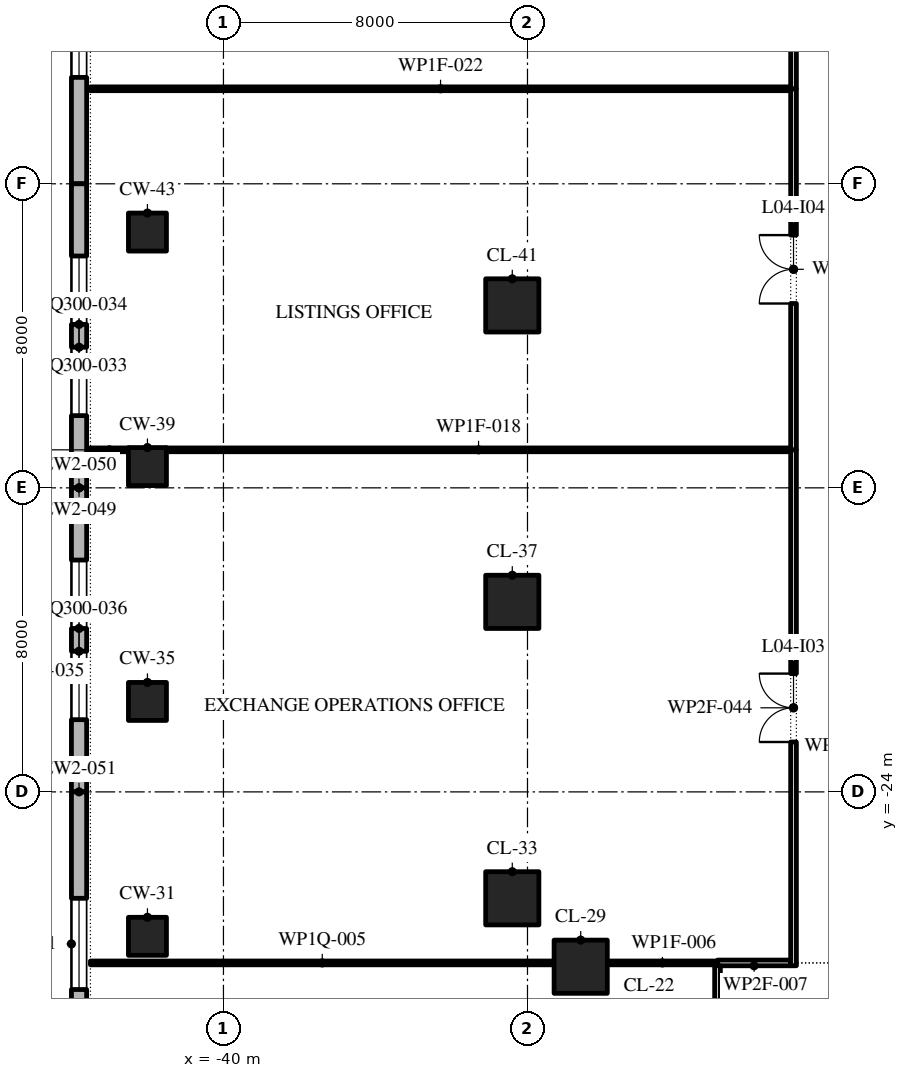
"""IFC4 building model, lengths in metres.
Left out: names, types, materials, properties, quantities, classifications, styles, units other than length and angle.
Written with IfcOpenShell. Run it as: python <this file> out.ifc"""

import sys

from ifc_helpers import new_model, si_unit, direction, frame, frame_2d, origin, origin_2d, place, context, subcontext, project, spatial, polyline, rectangle, outline, extrude, element, fill, save


model = new_model("IFC4")
c1 = context("Model", 3, precision=1e-05, world=origin(), true_north=direction((0.0, 1.0)))
c2 = subcontext(c1, "Body", "Model", "MODEL_VIEW")
j1 = project(units=[si_unit("LENGTHUNIT", "METRE"), si_unit("PLANEANGLEUNIT", "RADIAN")], contexts=[c1])
p1 = place(None, origin())
s1 = spatial("IfcSite", under=j1, at=p1, CompositionType="ELEMENT")
p2 = place(p1, origin())
s2 = spatial("IfcBuilding", under=s1, at=p2, CompositionType="ELEMENT")
p3 = place(p2, frame((0.0, 0.0, 24.0)))
s3 = spatial("IfcBuildingStorey", under=s2, at=p3, CompositionType="ELEMENT", Elevation=24.0)
p4 = place(p3, frame((-30.6, -28.6, 0.0), z_axis=(0.0, 0.0, 1.0), x_axis=(1.0, 0.0, 0.0)))
e1 = element("IfcColumn", 1, at=p4, inside=s3, PredefinedType="COLUMN", context=c2, shape_type="SweptSolid", body=[
    extrude(rectangle(XDim=1.4, YDim=1.4, at=origin_2d()), origin(), (0.0, 0.0, 1.0), 4.8),
])
p5 = place(p3, frame((-42.0, -27.8, 0.0), z_axis=(0.0, 0.0, 1.0), x_axis=(1.0, 0.0, 0.0)))
e2 = element("IfcColumn", 2, at=p5, inside=s3, PredefinedType="COLUMN", context=c2, shape_type="SweptSolid", body=[
    extrude(rectangle(XDim=1.0, YDim=1.0, at=origin_2d()), origin(), (0.0, 0.0, 1.0), 4.8),
])
p6 = place(p3, frame((-32.4, -26.8, 0.0), z_axis=(0.0, 0.0, 1.0), x_axis=(1.0, 0.0, 0.0)))
e3 = element("IfcColumn", 3, at=p6, inside=s3, PredefinedType="COLUMN", context=c2, shape_type="SweptSolid", body=[
    extrude(rectangle(XDim=1.4, YDim=1.4, at=origin_2d()), origin(), (0.0, 0.0, 1.0), 4.8),
])
p7 = place(p3, frame((-42.0, -21.62, 0.0), z_axis=(0.0, 0.0, 1.0), x_axis=(1.0, 0.0, 0.0)))
e4 = element("IfcColumn", 4, at=p7, inside=s3, PredefinedType="COLUMN", context=c2, shape_type="SweptSolid", body=[
    extrude(rectangle(XDim=1.0, YDim=1.0, at=origin_2d()), origin(), (0.0, 0.0, 1.0), 4.8),
])
p8 = place(p3, frame((-32.4, -19.0, 0.0), z_axis=(0.0, 0.0, 1.0), x_axis=(1.0, 0.0, 0.0)))
e5 = element("IfcColumn", 5, at=p8, inside=s3, PredefinedType="COLUMN", context=c2, shape_type="SweptSolid", body=[
    extrude(rectangle(XDim=1.4, YDim=1.4, at=origin_2d()), origin(), (0.0, 0.0, 1.0), 4.8),
])
p9 = place(p3, frame((-42.0, -15.44, 0.0), z_axis=(0.0, 0.0, 1.0), x_axis=(1.0, 0.0, 0.0)))
e6 = element("IfcColumn", 6, at=p9, inside=s3, PredefinedType="COLUMN", context=c2, shape_type="SweptSolid", body=[
    extrude(rectangle(XDim=1.0, YDim=1.0, at=origin_2d()), origin(), (0.0, 0.0, 1.0), 4.8),
])
p10 = place(p3, frame((-32.4, -11.2, 0.0), z_axis=(0.0, 0.0, 1.0), x_axis=(1.0, 0.0, 0.0)))
e7 = element("IfcColumn", 7, at=p10, inside=s3, PredefinedType="COLUMN", context=c2, shape_type="SweptSolid", body=[
    extrude(rectangle(XDim=1.4, YDim=1.4, at=origin_2d()), origin(), (0.0, 0.0, 1.0), 4.8),
])
p11 = place(p3, frame((-42.0, -9.27, 0.0), z_axis=(0.0, 0.0, 1.0), x_axis=(1.0, 0.0, 0.0)))
e8 = element("IfcColumn", 8, at=p11, inside=s3, PredefinedType="COLUMN", context=c2, shape_type="SweptSolid", body=[
    extrude(rectangle(XDim=1.0, YDim=1.0, at=origin_2d()), origin(), (0.0, 0.0, 1.0), 4.8),
])
p12 = place(p3, frame((-43.8, 0.0, 0.0), z_axis=(0.0, 0.0, 1.0), x_axis=(0.0, -1.0, 0.0)))
e9 = element("IfcWall", 9, at=p12, inside=s3, PredefinedType="STANDARD", context=c2, shape_type="SweptSolid", body=[
    extrude(rectangle(XDim=8.0, YDim=0.4, at=frame_2d((4.0, 0.0))), origin(), (0.0, 0.0, 1.0), 4.5),
])
p13 = place(p12, frame((2.8, 0.0, 0.9)))
e10 = element("IfcOpeningElement", 10, at=p13, cuts=e9, PredefinedType="OPENING", context=c2, shape_type="SweptSolid", body=[
    extrude(outline(polyline([(0.0, 0.0), (2.4, 0.0), (2.4, 1.5), (2.378, 1.758), (2.313, 2.009), (2.207, 2.245), (2.063, 2.46), (1.885, 2.648), (1.677, 2.804), (1.447, 2.922), (1.2, 3.0), (0.953, 2.922), (0.722, 2.804), (0.515, 2.648), (0.337, 2.46), (0.193, 2.245), (0.087, 2.009), (0.022, 1.758), (0.0, 1.5), (0.0, 0.0)])), frame((0.0, 0.21, 0.0), z_axis=(0.0, -1.0, 0.0), x_axis=(1.0, 0.0, 0.0)), (0.0, 0.0, 1.0), 0.42),
])
p14 = place(p3, frame((-43.8, -8.0, 0.0), z_axis=(0.0, 0.0, 1.0), x_axis=(0.0, -1.0, 0.0)))
e11 = element("IfcWall", 11, at=p14, inside=s3, PredefinedType="STANDARD", context=c2, shape_type="SweptSolid", body=[
    extrude(rectangle(XDim=8.0, YDim=0.4, at=frame_2d((4.0, 0.0))), origin(), (0.0, 0.0, 1.0), 4.5),
])
p15 = place(p14, frame((1.9, 0.0, 0.9)))
e12 = element("IfcOpeningElement", 12, at=p15, cuts=e11, PredefinedType="OPENING", context=c2, shape_type="SweptSolid", body=[
    extrude(outline(polyline([(0.0, 0.0), (1.8, 0.0), (1.8, 1.5), (1.785, 1.729), (1.738, 1.954), (1.662, 2.17), (1.558, 2.375), (1.427, 2.563), (1.271, 2.732), (1.095, 2.879), (0.9, 3.0), (0.705, 2.879), (0.529, 2.732), (0.373, 2.563), (0.242, 2.375), (0.138, 2.17), (0.062, 1.954), (0.015, 1.729), (0.0, 1.5), (0.0, 0.0)])), frame((0.0, 0.21, 0.0), z_axis=(0.0, -1.0, 0.0), x_axis=(1.0, 0.0, 0.0)), (0.0, 0.0, 1.0), 0.42),
])
p16 = place(p14, frame((4.3, 0.0, 0.9)))
e13 = element("IfcOpeningElement", 13, at=p16, cuts=e11, PredefinedType="OPENING", context=c2, shape_type="SweptSolid", body=[
    extrude(outline(polyline([(0.0, 0.0), (1.8, 0.0), (1.8, 1.5), (1.785, 1.729), (1.738, 1.954), (1.662, 2.17), (1.558, 2.375), (1.427, 2.563), (1.271, 2.732), (1.095, 2.879), (0.9, 3.0), (0.705, 2.879), (0.529, 2.732), (0.373, 2.563), (0.242, 2.375), (0.138, 2.17), (0.062, 1.954), (0.015, 1.729), (0.0, 1.5), (0.0, 0.0)])), frame((0.0, 0.21, 0.0), z_axis=(0.0, -1.0, 0.0), x_axis=(1.0, 0.0, 0.0)), (0.0, 0.0, 1.0), 0.42),
])
p17 = place(p3, frame((-43.8, -16.0, 0.0), z_axis=(0.0, 0.0, 1.0), x_axis=(0.0, -1.0, 0.0)))
e14 = element("IfcWall", 14, at=p17, inside=s3, PredefinedType="STANDARD", context=c2, shape_type="SweptSolid", body=[
    extrude(rectangle(XDim=8.0, YDim=0.4, at=frame_2d((4.0, 0.0))), origin(), (0.0, 0.0, 1.0), 4.5),
])
p18 = place(p17, frame((1.9, 0.0, 0.9)))
e15 = element("IfcOpeningElement", 15, at=p18, cuts=e14, PredefinedType="OPENING", context=c2, shape_type="SweptSolid", body=[
    extrude(outline(polyline([(0.0, 0.0), (1.8, 0.0), (1.8, 1.5), (1.785, 1.729), (1.738, 1.954), (1.662, 2.17), (1.558, 2.375), (1.427, 2.563), (1.271, 2.732), (1.095, 2.879), (0.9, 3.0), (0.705, 2.879), (0.529, 2.732), (0.373, 2.563), (0.242, 2.375), (0.138, 2.17), (0.062, 1.954), (0.015, 1.729), (0.0, 1.5), (0.0, 0.0)])), frame((0.0, 0.21, 0.0), z_axis=(0.0, -1.0, 0.0), x_axis=(1.0, 0.0, 0.0)), (0.0, 0.0, 1.0), 0.42),
])
p19 = place(p17, frame((4.3, 0.0, 0.9)))
e16 = element("IfcOpeningElement", 16, at=p19, cuts=e14, PredefinedType="OPENING", context=c2, shape_type="SweptSolid", body=[
    extrude(outline(polyline([(0.0, 0.0), (1.8, 0.0), (1.8, 1.5), (1.785, 1.729), (1.738, 1.954), (1.662, 2.17), (1.558, 2.375), (1.427, 2.563), (1.271, 2.732), (1.095, 2.879), (0.9, 3.0), (0.705, 2.879), (0.529, 2.732), (0.373, 2.563), (0.242, 2.375), (0.138, 2.17), (0.062, 1.954), (0.015, 1.729), (0.0, 1.5), (0.0, 0.0)])), frame((0.0, 0.21, 0.0), z_axis=(0.0, -1.0, 0.0), x_axis=(1.0, 0.0, 0.0)), (0.0, 0.0, 1.0), 0.42),
])
p20 = place(p3, frame((-43.8, -24.0, 0.0), z_axis=(0.0, 0.0, 1.0), x_axis=(0.0, -1.0, 0.0)))
e17 = element("IfcWall", 17, at=p20, inside=s3, PredefinedType="STANDARD", context=c2, shape_type="SweptSolid", body=[
    extrude(rectangle(XDim=8.0, YDim=0.4, at=frame_2d((4.0, 0.0))), origin(), (0.0, 0.0, 1.0), 4.5),
])
p21 = place(p20, frame((2.8, 0.0, 0.9)))
e18 = element("IfcOpeningElement", 18, at=p21, cuts=e17, PredefinedType="OPENING", context=c2, shape_type="SweptSolid", body=[
    extrude(outline(polyline([(0.0, 0.0), (2.4, 0.0), (2.4, 1.5), (2.378, 1.758), (2.313, 2.009), (2.207, 2.245), (2.063, 2.46), (1.885, 2.648), (1.677, 2.804), (1.447, 2.922), (1.2, 3.0), (0.953, 2.922), (0.722, 2.804), (0.515, 2.648), (0.337, 2.46), (0.193, 2.245), (0.087, 2.009), (0.022, 1.758), (0.0, 1.5), (0.0, 0.0)])), frame((0.0, 0.21, 0.0), z_axis=(0.0, -1.0, 0.0), x_axis=(1.0, 0.0, 0.0)), (0.0, 0.0, 1.0), 0.42),
])
p22 = place(p3, frame((-43.5, -28.5, 0.0), z_axis=(0.0, 0.0, 1.0), x_axis=(1.0, 0.0, 0.0)))
e19 = element("IfcWall", 19, at=p22, inside=s3, PredefinedType="PARTITIONING", context=c2, shape_type="SweptSolid", body=[
    extrude(rectangle(XDim=12.2, YDim=0.1, at=frame_2d((6.1, 0.0))), origin(), (0.0, 0.0, 1.0), 3.964),
])
p23 = place(p3, frame((-29.9, -28.5, 0.0), z_axis=(0.0, 0.0, 1.0), x_axis=(1.0, 0.0, 0.0)))
e20 = element("IfcWall", 20, at=p23, inside=s3, PredefinedType="PARTITIONING", context=c2, shape_type="SweptSolid", body=[
    extrude(rectangle(XDim=2.9, YDim=0.1, at=frame_2d((1.45, 0.0))), origin(), (0.0, 0.0, 1.0), 4.5),
])
p24 = place(p3, frame((-27.0, -28.5, 0.0), z_axis=(0.0, 0.0, 1.0), x_axis=(1.0, 0.0, 0.0)))
e21 = element("IfcWall", 21, at=p24, inside=s3, PredefinedType="PARTITIONING", context=c2, shape_type="SweptSolid", body=[
    extrude(rectangle(XDim=1.925, YDim=0.15, at=frame_2d((0.962, 0.0))), origin(), (0.0, 0.0, 1.0), 4.5),
])
p25 = place(p3, frame((-43.5, -15.0, 0.0), z_axis=(0.0, 0.0, 1.0), x_axis=(1.0, 0.0, 0.0)))
e22 = element("IfcWall", 22, at=p25, inside=s3, PredefinedType="PARTITIONING", context=c2, shape_type="SweptSolid", body=[
    extrude(rectangle(XDim=1.0, YDim=0.1, at=frame_2d((0.5, 0.0))), origin(), (0.0, 0.0, 1.0), 4.5),
])
p26 = place(p3, frame((-41.5, -15.0, 0.0), z_axis=(0.0, 0.0, 1.0), x_axis=(1.0, 0.0, 0.0)))
e23 = element("IfcWall", 23, at=p26, inside=s3, PredefinedType="PARTITIONING", context=c2, shape_type="SweptSolid", body=[
    extrude(rectangle(XDim=16.425, YDim=0.1, at=frame_2d((8.212, 0.0))), origin(), (0.0, 0.0, 1.0), 4.5),
])
p27 = place(p3, frame((-43.5, -5.5, 0.0), z_axis=(0.0, 0.0, 1.0), x_axis=(1.0, 0.0, 0.0)))
e24 = element("IfcWall", 24, at=p27, inside=s3, PredefinedType="PARTITIONING", context=c2, shape_type="SweptSolid", body=[
    extrude(rectangle(XDim=18.425, YDim=0.1, at=frame_2d((9.212, 0.0))), origin(), (0.0, 0.0, 1.0), 4.5),
])
p28 = place(p3, frame((-27.0, -32.0, 0.0), z_axis=(0.0, 0.0, 1.0), x_axis=(0.0, 1.0, 0.0)))
e25 = element("IfcWall", 25, at=p28, inside=s3, PredefinedType="PARTITIONING", context=c2, shape_type="SweptSolid", body=[
    extrude(rectangle(XDim=3.425, YDim=0.15, at=frame_2d((1.712, 0.0))), origin(), (0.0, 0.0, 1.0), 4.5),
])
p29 = place(p3, frame((-25.0, -28.575, 0.0), z_axis=(0.0, 0.0, 1.0), x_axis=(0.0, 1.0, 0.0)))
e26 = element("IfcWall", 26, at=p29, inside=s3, PredefinedType="PARTITIONING", context=c2, shape_type="SweptSolid", body=[
    extrude(rectangle(XDim=13.575, YDim=0.15, at=frame_2d((6.788, 0.0))), origin(), (0.0, 0.0, 1.0), 4.5),
])
p30 = place(p29, frame((5.887, 0.0, 0.0)))
e27 = element("IfcOpeningElement", 27, at=p30, cuts=e26, PredefinedType="OPENING", context=c2, shape_type="SweptSolid", body=[
    extrude(rectangle(XDim=1.8, YDim=2.1, at=frame_2d((0.9, 1.05))), frame((0.0, 0.085, 0.0), z_axis=(0.0, -1.0, 0.0), x_axis=(1.0, 0.0, 0.0)), (0.0, 0.0, 1.0), 0.17),
])
p31 = place(p3, frame((-25.0, -15.0, 0.0), z_axis=(0.0, 0.0, 1.0), x_axis=(0.0, 1.0, 0.0)))
e28 = element("IfcWall", 28, at=p31, inside=s3, PredefinedType="PARTITIONING", context=c2, shape_type="SweptSolid", body=[
    extrude(rectangle(XDim=9.5, YDim=0.15, at=frame_2d((4.75, 0.0))), origin(), (0.0, 0.0, 1.0), 4.5),
])
p32 = place(p31, frame((3.85, 0.0, 0.0)))
e29 = element("IfcOpeningElement", 29, at=p32, cuts=e28, PredefinedType="OPENING", context=c2, shape_type="SweptSolid", body=[
    extrude(rectangle(XDim=1.8, YDim=2.1, at=frame_2d((0.9, 1.05))), frame((0.0, 0.085, 0.0), z_axis=(0.0, -1.0, 0.0), x_axis=(1.0, 0.0, 0.0)), (0.0, 0.0, 1.0), 0.17),
])
p33 = place(p3, frame((-25.0, -5.5, 0.0), z_axis=(0.0, 0.0, 1.0), x_axis=(0.0, 1.0, 0.0)))
e30 = element("IfcWall", 30, at=p33, inside=s3, PredefinedType="PARTITIONING", context=c2, shape_type="SweptSolid", body=[
    extrude(rectangle(XDim=10.5, YDim=0.15, at=frame_2d((5.25, 0.0))), origin(), (0.0, 0.0, 1.0), 4.5),
])
p34 = place(p33, frame((4.35, 0.0, 0.0)))
e31 = element("IfcOpeningElement", 31, at=p34, cuts=e30, PredefinedType="OPENING", context=c2, shape_type="SweptSolid", body=[
    extrude(rectangle(XDim=1.8, YDim=2.1, at=frame_2d((0.9, 1.05))), frame((0.0, 0.085, 0.0), z_axis=(0.0, -1.0, 0.0), x_axis=(1.0, 0.0, 0.0)), (0.0, 0.0, 1.0), 0.17),
])
p35 = place(p13, origin())
e32 = element("IfcWindow", 32, at=p35, inside=s3, PartitioningType="DOUBLE_PANEL_VERTICAL", PredefinedType="WINDOW", context=c2, shape_type="SweptSolid", body=[
    extrude(outline(polyline([(0.0, 0.0), (2.4, 0.0), (2.4, 1.5), (2.378, 1.758), (2.313, 2.009), (2.207, 2.245), (2.063, 2.46), (1.885, 2.648), (1.677, 2.804), (1.447, 2.922), (1.2, 3.0), (0.953, 2.922), (0.722, 2.804), (0.515, 2.648), (0.337, 2.46), (0.193, 2.245), (0.087, 2.009), (0.022, 1.758), (0.0, 1.5), (0.0, 0.0)])), frame((0.0, 0.03, 0.0), z_axis=(0.0, -1.0, 0.0), x_axis=(1.0, 0.0, 0.0)), (0.0, 0.0, 1.0), 0.06),
])
fill(e10, e32)
p36 = place(p15, origin())
e33 = element("IfcWindow", 33, at=p36, inside=s3, PartitioningType="DOUBLE_PANEL_VERTICAL", PredefinedType="WINDOW", context=c2, shape_type="SweptSolid", body=[
    extrude(outline(polyline([(0.0, 0.0), (1.8, 0.0), (1.8, 1.5), (1.785, 1.729), (1.738, 1.954), (1.662, 2.17), (1.558, 2.375), (1.427, 2.563), (1.271, 2.732), (1.095, 2.879), (0.9, 3.0), (0.705, 2.879), (0.529, 2.732), (0.373, 2.563), (0.242, 2.375), (0.138, 2.17), (0.062, 1.954), (0.015, 1.729), (0.0, 1.5), (0.0, 0.0)])), frame((0.0, 0.03, 0.0), z_axis=(0.0, -1.0, 0.0), x_axis=(1.0, 0.0, 0.0)), (0.0, 0.0, 1.0), 0.06),
])
fill(e12, e33)
p37 = place(p16, origin())
e34 = element("IfcWindow", 34, at=p37, inside=s3, PartitioningType="DOUBLE_PANEL_VERTICAL", PredefinedType="WINDOW", context=c2, shape_type="SweptSolid", body=[
    extrude(outline(polyline([(0.0, 0.0), (1.8, 0.0), (1.8, 1.5), (1.785, 1.729), (1.738, 1.954), (1.662, 2.17), (1.558, 2.375), (1.427, 2.563), (1.271, 2.732), (1.095, 2.879), (0.9, 3.0), (0.705, 2.879), (0.529, 2.732), (0.373, 2.563), (0.242, 2.375), (0.138, 2.17), (0.062, 1.954), (0.015, 1.729), (0.0, 1.5), (0.0, 0.0)])), frame((0.0, 0.03, 0.0), z_axis=(0.0, -1.0, 0.0), x_axis=(1.0, 0.0, 0.0)), (0.0, 0.0, 1.0), 0.06),
])
fill(e13, e34)
p38 = place(p18, origin())
e35 = element("IfcWindow", 35, at=p38, inside=s3, PartitioningType="DOUBLE_PANEL_VERTICAL", PredefinedType="WINDOW", context=c2, shape_type="SweptSolid", body=[
    extrude(outline(polyline([(0.0, 0.0), (1.8, 0.0), (1.8, 1.5), (1.785, 1.729), (1.738, 1.954), (1.662, 2.17), (1.558, 2.375), (1.427, 2.563), (1.271, 2.732), (1.095, 2.879), (0.9, 3.0), (0.705, 2.879), (0.529, 2.732), (0.373, 2.563), (0.242, 2.375), (0.138, 2.17), (0.062, 1.954), (0.015, 1.729), (0.0, 1.5), (0.0, 0.0)])), frame((0.0, 0.03, 0.0), z_axis=(0.0, -1.0, 0.0), x_axis=(1.0, 0.0, 0.0)), (0.0, 0.0, 1.0), 0.06),
])
fill(e15, e35)
p39 = place(p19, origin())
e36 = element("IfcWindow", 36, at=p39, inside=s3, PartitioningType="DOUBLE_PANEL_VERTICAL", PredefinedType="WINDOW", context=c2, shape_type="SweptSolid", body=[
    extrude(outline(polyline([(0.0, 0.0), (1.8, 0.0), (1.8, 1.5), (1.785, 1.729), (1.738, 1.954), (1.662, 2.17), (1.558, 2.375), (1.427, 2.563), (1.271, 2.732), (1.095, 2.879), (0.9, 3.0), (0.705, 2.879), (0.529, 2.732), (0.373, 2.563), (0.242, 2.375), (0.138, 2.17), (0.062, 1.954), (0.015, 1.729), (0.0, 1.5), (0.0, 0.0)])), frame((0.0, 0.03, 0.0), z_axis=(0.0, -1.0, 0.0), x_axis=(1.0, 0.0, 0.0)), (0.0, 0.0, 1.0), 0.06),
])
fill(e16, e36)
p40 = place(p21, origin())
e37 = element("IfcWindow", 37, at=p40, inside=s3, PartitioningType="DOUBLE_PANEL_VERTICAL", PredefinedType="WINDOW", context=c2, shape_type="SweptSolid", body=[
    extrude(outline(polyline([(0.0, 0.0), (2.4, 0.0), (2.4, 1.5), (2.378, 1.758), (2.313, 2.009), (2.207, 2.245), (2.063, 2.46), (1.885, 2.648), (1.677, 2.804), (1.447, 2.922), (1.2, 3.0), (0.953, 2.922), (0.722, 2.804), (0.515, 2.648), (0.337, 2.46), (0.193, 2.245), (0.087, 2.009), (0.022, 1.758), (0.0, 1.5), (0.0, 0.0)])), frame((0.0, 0.03, 0.0), z_axis=(0.0, -1.0, 0.0), x_axis=(1.0, 0.0, 0.0)), (0.0, 0.0, 1.0), 0.06),
])
fill(e18, e37)
p41 = place(p30, origin())
e38 = element("IfcDoor", 38, at=p41, inside=s3, OperationType="SINGLE_SWING_LEFT", PredefinedType="DOOR", context=c2, shape_type="SweptSolid", body=[
    extrude(rectangle(XDim=1.8, YDim=2.1, at=frame_2d((0.9, 1.05))), frame((0.0, 0.025, 0.0), z_axis=(0.0, -1.0, 0.0), x_axis=(1.0, 0.0, 0.0)), (0.0, 0.0, 1.0), 0.05),
])
fill(e27, e38)
p42 = place(p32, origin())
e39 = element("IfcDoor", 39, at=p42, inside=s3, OperationType="SINGLE_SWING_RIGHT", PredefinedType="DOOR", context=c2, shape_type="SweptSolid", body=[
    extrude(rectangle(XDim=1.8, YDim=2.1, at=frame_2d((0.9, 1.05))), frame((0.0, 0.025, 0.0), z_axis=(0.0, -1.0, 0.0), x_axis=(1.0, 0.0, 0.0)), (0.0, 0.0, 1.0), 0.05),
])
fill(e29, e39)
save(model, sys.argv[1])
